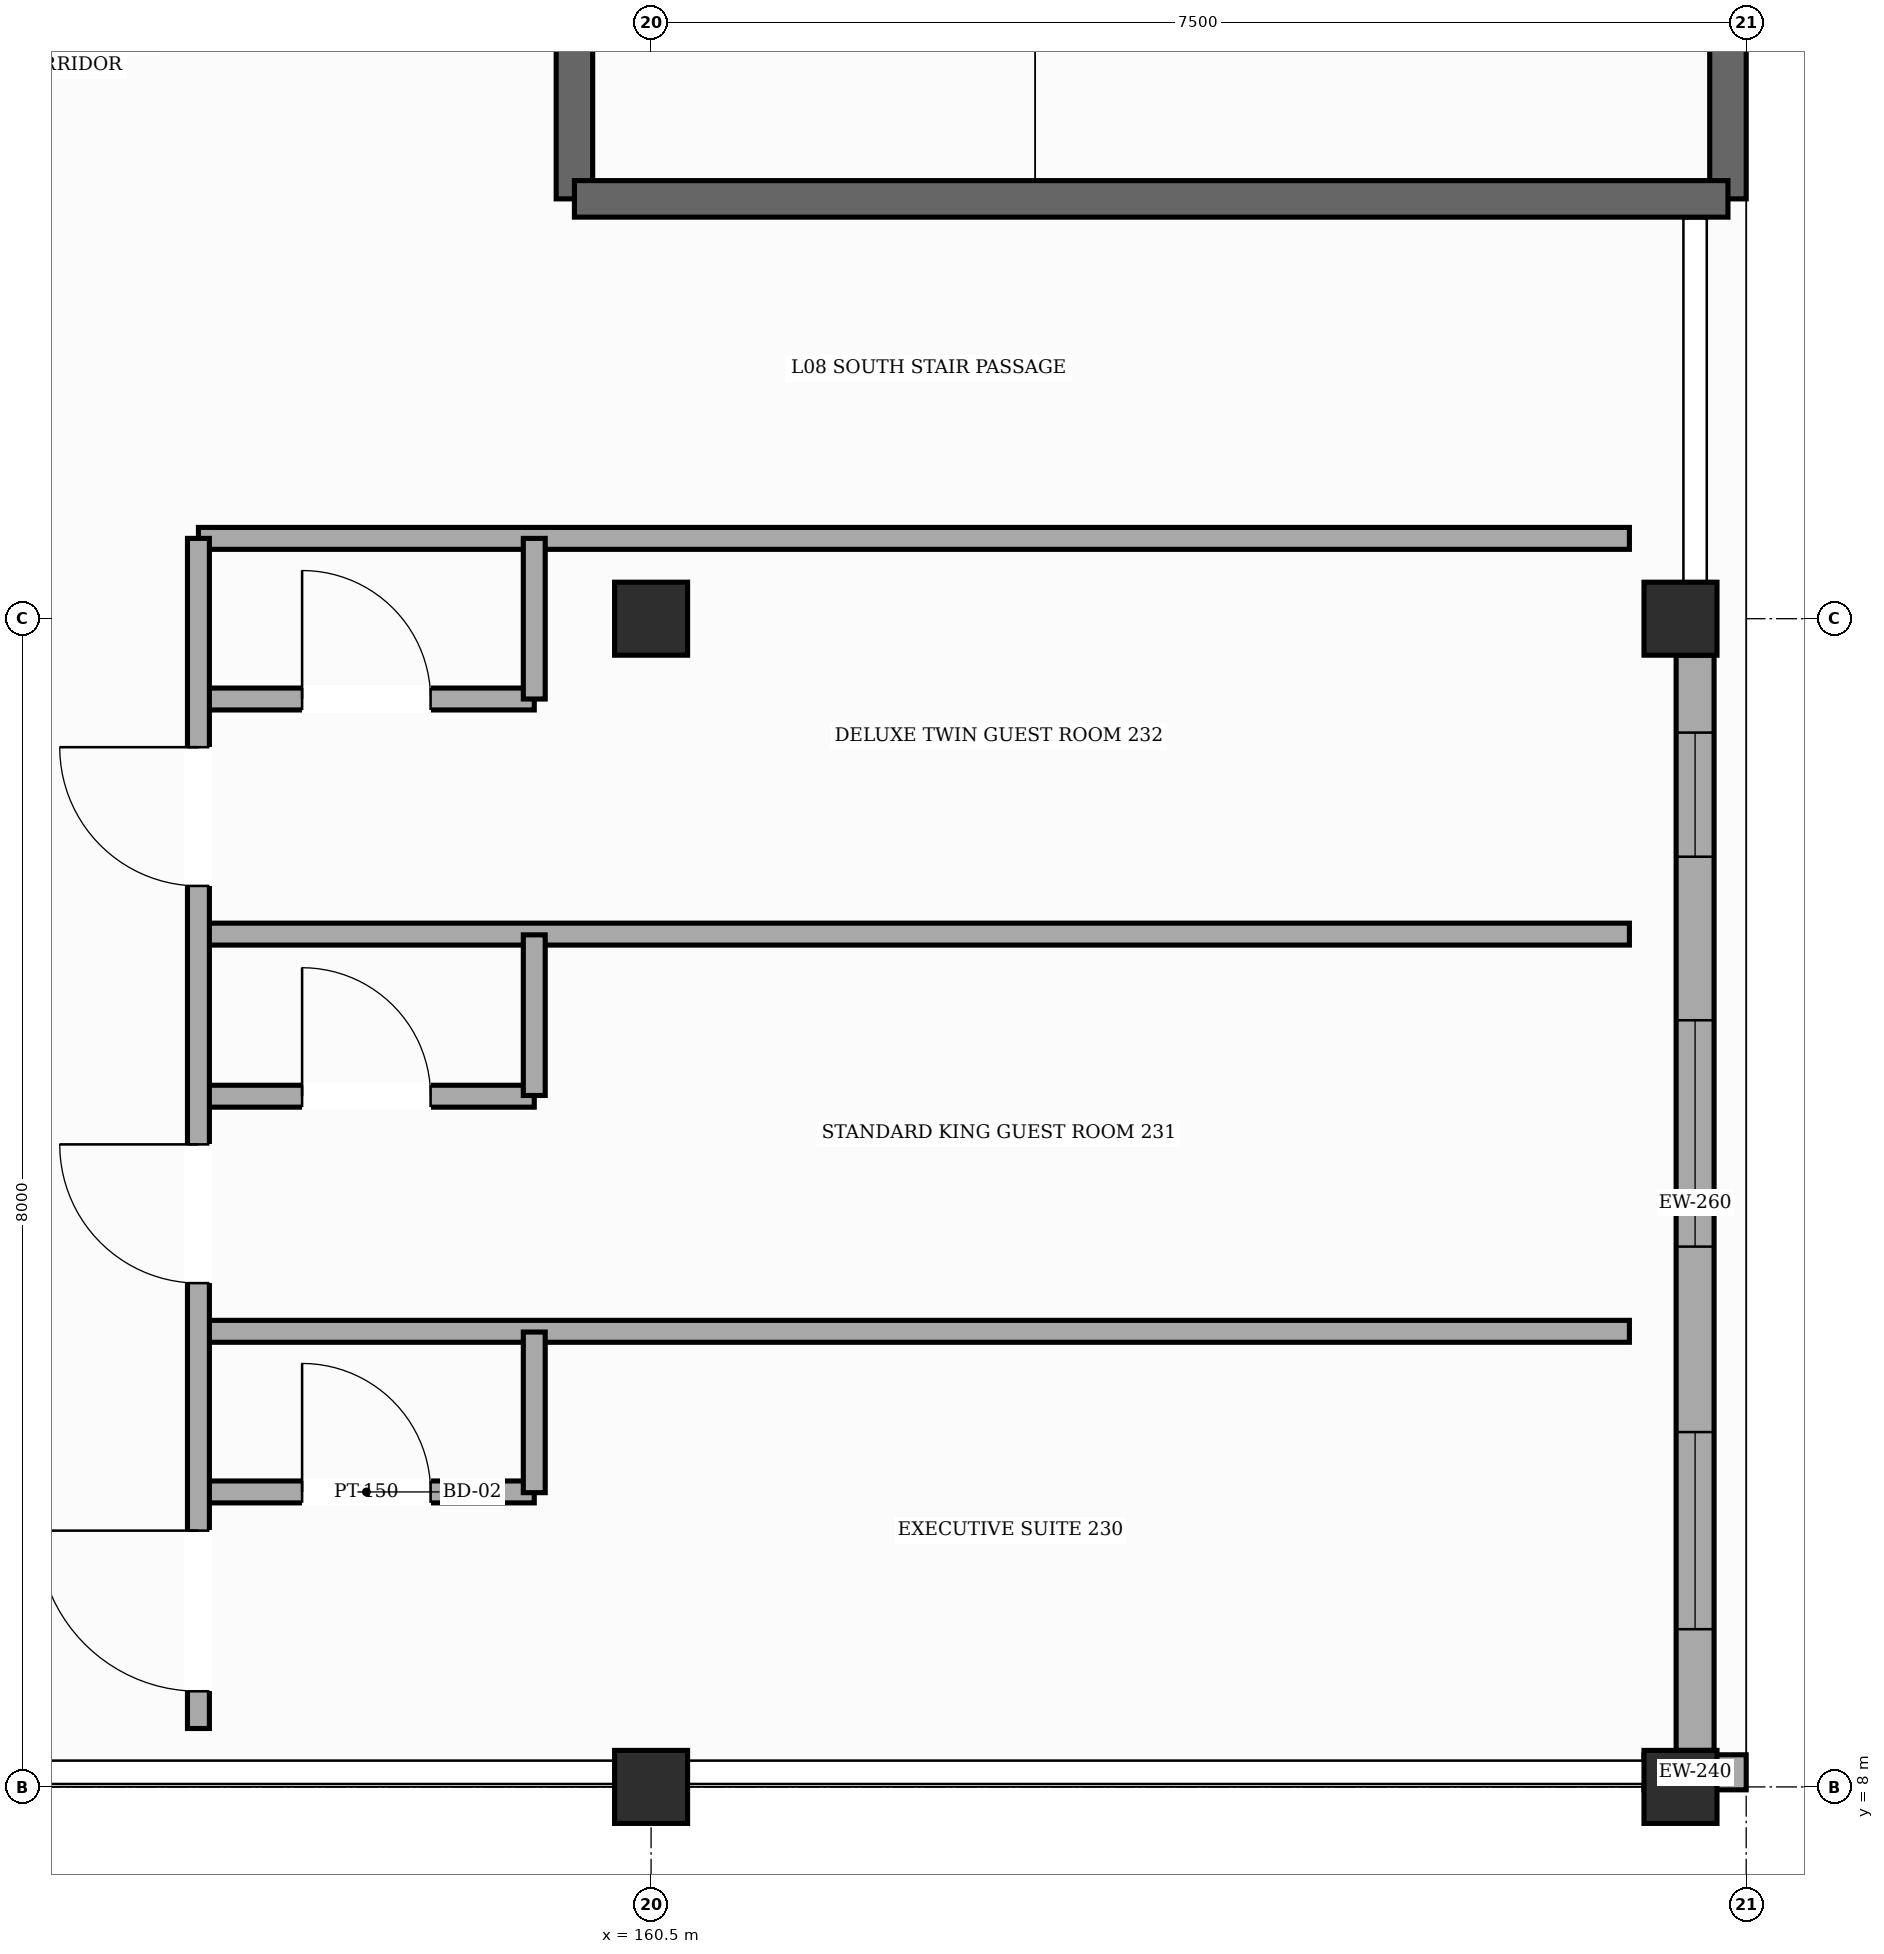
"""IFC4 building model, lengths in metres.
Left out: names, types, materials, properties, quantities, classifications, styles, units other than length and angle.
Written with IfcOpenShell. Run it as: python <this file> out.ifc"""

import sys

from ifc_helpers import new_model, si_unit, direction, frame, frame_2d, origin, origin_2d, place, context, subcontext, project, spatial, rectangle, hollow_rectangle, extrude, element, fill, save


model = new_model("IFC4")
c1 = context("Model", 3, precision=1e-05, world=origin(), true_north=direction((0.0, 1.0)))
c2 = subcontext(c1, "Body", "Model", "MODEL_VIEW")
j1 = project(units=[si_unit("LENGTHUNIT", "METRE"), si_unit("PLANEANGLEUNIT", "RADIAN")], contexts=[c1])
p1 = place(None, origin())
s1 = spatial("IfcSite", under=j1, at=p1, CompositionType="ELEMENT")
p2 = place(p1, origin())
s2 = spatial("IfcBuilding", under=s1, at=p2, CompositionType="ELEMENT")
p3 = place(p2, frame((0.0, 0.0, 35.4)))
s3 = spatial("IfcBuildingStorey", under=s2, at=p3, CompositionType="ELEMENT", Elevation=35.4)
for number, where, z_axis, x_axis in (
    (1, (160.5, 8.0, 0.0), (0.0, 0.0, 1.0), (1.0, 0.0, 0.0)),
    (2, (160.5, 16.0, 0.0), (0.0, 0.0, 1.0), (1.0, 0.0, 0.0)),
    (3, (167.55, 8.0, 0.0), (0.0, 0.0, 1.0), (1.0, 0.0, 0.0)),
    (4, (167.55, 16.0, 0.0), (0.0, 0.0, 1.0), (1.0, 0.0, 0.0)),
):
    element("IfcColumn", number, at=place(p3, frame(where, z_axis=z_axis, x_axis=x_axis)), inside=s3, PredefinedType="COLUMN", context=c2, shape_type="SweptSolid", body=[
        extrude(hollow_rectangle(XDim=0.5, YDim=0.5, WallThickness=0.022, InnerFilletRadius=0.022, OuterFilletRadius=0.044, at=origin_2d()), origin(), (0.0, 0.0, 1.0), 3.6),
    ])
p4 = place(p3, frame((167.65, 15.75, 0.0), z_axis=(0.0, 0.0, 1.0), x_axis=(0.0, -1.0, 0.0)))
e5 = element("IfcWall", 5, at=p4, inside=s3, PredefinedType="SOLIDWALL", context=c2, shape_type="SweptSolid", body=[
    extrude(rectangle(XDim=7.5, YDim=0.26, at=frame_2d((3.75, 0.0))), origin(), (0.0, 0.0, 1.0), 2.755),
])
p5 = place(p4, frame((5.32, 0.0, 0.85)))
e6 = element("IfcOpeningElement", 6, at=p5, cuts=e5, PredefinedType="OPENING", context=c2, shape_type="SweptSolid", body=[
    extrude(rectangle(XDim=1.35, YDim=1.65, at=frame_2d((0.675, 0.825))), frame((0.0, 0.14, 0.0), z_axis=(0.0, -1.0, 0.0), x_axis=(1.0, 0.0, 0.0)), (0.0, 0.0, 1.0), 0.28),
])
p6 = place(p4, frame((2.5, 0.0, 0.85)))
e7 = element("IfcOpeningElement", 7, at=p6, cuts=e5, PredefinedType="OPENING", context=c2, shape_type="SweptSolid", body=[
    extrude(rectangle(XDim=1.55, YDim=1.65, at=frame_2d((0.775, 0.825))), frame((0.0, 0.14, 0.0), z_axis=(0.0, -1.0, 0.0), x_axis=(1.0, 0.0, 0.0)), (0.0, 0.0, 1.0), 0.28),
])
p7 = place(p4, frame((0.53, 0.0, 0.85)))
e8 = element("IfcOpeningElement", 8, at=p7, cuts=e5, PredefinedType="OPENING", context=c2, shape_type="SweptSolid", body=[
    extrude(rectangle(XDim=0.85, YDim=1.35, at=frame_2d((0.425, 0.675))), frame((0.0, 0.14, 0.0), z_axis=(0.0, -1.0, 0.0), x_axis=(1.0, 0.0, 0.0)), (0.0, 0.0, 1.0), 0.28),
])
p8 = place(p3, frame((168.0, 8.1, 0.0), z_axis=(0.0, 0.0, 1.0), x_axis=(-1.0, 0.0, 0.0)))
e9 = element("IfcWall", 9, at=p8, inside=s3, PredefinedType="SOLIDWALL", context=c2, shape_type="SweptSolid", body=[
    extrude(rectangle(XDim=0.7, YDim=0.24, at=frame_2d((0.35, 0.0))), origin(), (0.0, 0.0, 1.0), 3.365),
])
for number, where, z_axis, x_axis in (
    (10, (167.875, 22.225, 0.0), (0.0, 0.0, 1.0), (0.0, -1.0, 0.0)),
    (11, (159.975, 18.875, 0.0), (0.0, 0.0, 1.0), (0.0, 1.0, 0.0)),
):
    element("IfcWall", number, at=place(p3, frame(where, z_axis=z_axis, x_axis=x_axis)), inside=s3, PredefinedType="SHEAR", context=c2, shape_type="SweptSolid", body=[
        extrude(rectangle(XDim=3.35, YDim=0.25, at=frame_2d((1.675, 0.0))), origin(), (0.0, 0.0, 1.0), 3.38),
    ])
p9 = place(p3, frame((167.875, 18.875, 0.0), z_axis=(0.0, 0.0, 1.0), x_axis=(-1.0, 0.0, 0.0)))
e12 = element("IfcWall", 12, at=p9, inside=s3, PredefinedType="SHEAR", context=c2, shape_type="SweptSolid", body=[
    extrude(rectangle(XDim=7.9, YDim=0.25, at=frame_2d((3.95, 0.0))), origin(), (0.0, 0.0, 1.0), 3.38),
])
p10 = place(p3, frame((157.4, 10.02, 0.0), z_axis=(0.0, 0.0, 1.0), x_axis=(1.0, 0.0, 0.0)))
e13 = element("IfcWall", 13, at=p10, inside=s3, PredefinedType="PARTITIONING", context=c2, shape_type="SweptSolid", body=[
    extrude(rectangle(XDim=2.3, YDim=0.15, at=frame_2d((1.15, 0.0))), origin(), (0.0, 0.0, 1.0), 3.365),
])
p11 = place(p10, frame((0.71, 0.0, 0.0)))
e14 = element("IfcOpeningElement", 14, at=p11, cuts=e13, PredefinedType="OPENING", context=c2, shape_type="SweptSolid", body=[
    extrude(rectangle(XDim=0.88, YDim=2.12, at=frame_2d((0.44, 1.06))), frame((0.0, 0.085, 0.0), z_axis=(0.0, -1.0, 0.0), x_axis=(1.0, 0.0, 0.0)), (0.0, 0.0, 1.0), 0.17),
])
p12 = place(p3, frame((157.4, 11.12, 0.0), z_axis=(0.0, 0.0, 1.0), x_axis=(1.0, 0.0, 0.0)))
e15 = element("IfcWall", 15, at=p12, inside=s3, PredefinedType="PARTITIONING", context=c2, shape_type="SweptSolid", body=[
    extrude(rectangle(XDim=9.8, YDim=0.15, at=frame_2d((4.9, 0.0))), origin(), (0.0, 0.0, 1.0), 3.365),
])
p13 = place(p3, frame((157.4, 12.73, 0.0), z_axis=(0.0, 0.0, 1.0), x_axis=(1.0, 0.0, 0.0)))
e16 = element("IfcWall", 16, at=p13, inside=s3, PredefinedType="PARTITIONING", context=c2, shape_type="SweptSolid", body=[
    extrude(rectangle(XDim=2.3, YDim=0.15, at=frame_2d((1.15, 0.0))), origin(), (0.0, 0.0, 1.0), 3.365),
])
p14 = place(p13, frame((0.71, 0.0, 0.0)))
e17 = element("IfcOpeningElement", 17, at=p14, cuts=e16, PredefinedType="OPENING", context=c2, shape_type="SweptSolid", body=[
    extrude(rectangle(XDim=0.88, YDim=2.12, at=frame_2d((0.44, 1.06))), frame((0.0, 0.085, 0.0), z_axis=(0.0, -1.0, 0.0), x_axis=(1.0, 0.0, 0.0)), (0.0, 0.0, 1.0), 0.17),
])
p15 = place(p3, frame((157.4, 13.84, 0.0), z_axis=(0.0, 0.0, 1.0), x_axis=(1.0, 0.0, 0.0)))
e18 = element("IfcWall", 18, at=p15, inside=s3, PredefinedType="PARTITIONING", context=c2, shape_type="SweptSolid", body=[
    extrude(rectangle(XDim=9.8, YDim=0.15, at=frame_2d((4.9, 0.0))), origin(), (0.0, 0.0, 1.0), 3.365),
])
p16 = place(p3, frame((157.4, 15.45, 0.0), z_axis=(0.0, 0.0, 1.0), x_axis=(1.0, 0.0, 0.0)))
e19 = element("IfcWall", 19, at=p16, inside=s3, PredefinedType="PARTITIONING", context=c2, shape_type="SweptSolid", body=[
    extrude(rectangle(XDim=2.3, YDim=0.15, at=frame_2d((1.15, 0.0))), origin(), (0.0, 0.0, 1.0), 3.365),
])
p17 = place(p16, frame((0.71, 0.0, 0.0)))
e20 = element("IfcOpeningElement", 20, at=p17, cuts=e19, PredefinedType="OPENING", context=c2, shape_type="SweptSolid", body=[
    extrude(rectangle(XDim=0.88, YDim=2.12, at=frame_2d((0.44, 1.06))), frame((0.0, 0.085, 0.0), z_axis=(0.0, -1.0, 0.0), x_axis=(1.0, 0.0, 0.0)), (0.0, 0.0, 1.0), 0.17),
])
p18 = place(p3, frame((157.4, 16.55, 0.0), z_axis=(0.0, 0.0, 1.0), x_axis=(1.0, 0.0, 0.0)))
e21 = element("IfcWall", 21, at=p18, inside=s3, PredefinedType="PARTITIONING", context=c2, shape_type="SweptSolid", body=[
    extrude(rectangle(XDim=9.8, YDim=0.15, at=frame_2d((4.9, 0.0))), origin(), (0.0, 0.0, 1.0), 3.365),
])
p19 = place(p3, frame((157.4, 8.4, 0.0), z_axis=(0.0, 0.0, 1.0), x_axis=(0.0, 1.0, 0.0)))
e22 = element("IfcWall", 22, at=p19, inside=s3, PredefinedType="PARTITIONING", context=c2, shape_type="SweptSolid", body=[
    extrude(rectangle(XDim=8.15, YDim=0.15, at=frame_2d((4.075, 0.0))), origin(), (0.0, 0.0, 1.0), 3.365),
])
p20 = place(p19, frame((0.255, 0.0, 0.0)))
e23 = element("IfcOpeningElement", 23, at=p20, cuts=e22, PredefinedType="OPENING", context=c2, shape_type="SweptSolid", body=[
    extrude(rectangle(XDim=1.1, YDim=2.2, at=frame_2d((0.55, 1.1))), frame((0.0, 0.085, 0.0), z_axis=(0.0, -1.0, 0.0), x_axis=(1.0, 0.0, 0.0)), (0.0, 0.0, 1.0), 0.17),
])
p21 = place(p19, frame((3.05, 0.0, 0.0)))
e24 = element("IfcOpeningElement", 24, at=p21, cuts=e22, PredefinedType="OPENING", context=c2, shape_type="SweptSolid", body=[
    extrude(rectangle(XDim=0.95, YDim=2.15, at=frame_2d((0.475, 1.075))), frame((0.0, 0.085, 0.0), z_axis=(0.0, -1.0, 0.0), x_axis=(1.0, 0.0, 0.0)), (0.0, 0.0, 1.0), 0.17),
])
p22 = place(p19, frame((5.77, 0.0, 0.0)))
e25 = element("IfcOpeningElement", 25, at=p22, cuts=e22, PredefinedType="OPENING", context=c2, shape_type="SweptSolid", body=[
    extrude(rectangle(XDim=0.95, YDim=2.15, at=frame_2d((0.475, 1.075))), frame((0.0, 0.085, 0.0), z_axis=(0.0, -1.0, 0.0), x_axis=(1.0, 0.0, 0.0)), (0.0, 0.0, 1.0), 0.17),
])
p23 = place(p3, frame((159.7, 10.015, 0.0), z_axis=(0.0, 0.0, 1.0), x_axis=(0.0, 1.0, 0.0)))
e26 = element("IfcWall", 26, at=p23, inside=s3, PredefinedType="PARTITIONING", context=c2, shape_type="SweptSolid", body=[
    extrude(rectangle(XDim=1.1, YDim=0.15, at=frame_2d((0.55, 0.0))), origin(), (0.0, 0.0, 1.0), 3.365),
])
p24 = place(p3, frame((159.7, 12.735, 0.0), z_axis=(0.0, 0.0, 1.0), x_axis=(0.0, 1.0, 0.0)))
e27 = element("IfcWall", 27, at=p24, inside=s3, PredefinedType="PARTITIONING", context=c2, shape_type="SweptSolid", body=[
    extrude(rectangle(XDim=1.1, YDim=0.15, at=frame_2d((0.55, 0.0))), origin(), (0.0, 0.0, 1.0), 3.365),
])
p25 = place(p3, frame((159.7, 15.45, 0.0), z_axis=(0.0, 0.0, 1.0), x_axis=(0.0, 1.0, 0.0)))
e28 = element("IfcWall", 28, at=p25, inside=s3, PredefinedType="PARTITIONING", context=c2, shape_type="SweptSolid", body=[
    extrude(rectangle(XDim=1.1, YDim=0.15, at=frame_2d((0.55, 0.0))), origin(), (0.0, 0.0, 1.0), 3.365),
])
p26 = place(p5, origin())
e29 = element("IfcWindow", 29, at=p26, inside=s3, PartitioningType="SINGLE_PANEL", PredefinedType="WINDOW", context=c2, shape_type="SweptSolid", body=[
    extrude(rectangle(XDim=1.35, YDim=1.65, at=frame_2d((0.675, 0.825))), frame((0.0, 0.03, 0.0), z_axis=(0.0, -1.0, 0.0), x_axis=(1.0, 0.0, 0.0)), (0.0, 0.0, 1.0), 0.06),
])
fill(e6, e29)
p27 = place(p6, origin())
e30 = element("IfcWindow", 30, at=p27, inside=s3, PartitioningType="SINGLE_PANEL", PredefinedType="WINDOW", context=c2, shape_type="SweptSolid", body=[
    extrude(rectangle(XDim=1.55, YDim=1.65, at=frame_2d((0.775, 0.825))), frame((0.0, 0.03, 0.0), z_axis=(0.0, -1.0, 0.0), x_axis=(1.0, 0.0, 0.0)), (0.0, 0.0, 1.0), 0.06),
])
fill(e7, e30)
p28 = place(p7, origin())
e31 = element("IfcWindow", 31, at=p28, inside=s3, PartitioningType="SINGLE_PANEL", PredefinedType="WINDOW", context=c2, shape_type="SweptSolid", body=[
    extrude(rectangle(XDim=0.85, YDim=1.35, at=frame_2d((0.425, 0.675))), frame((0.0, 0.03, 0.0), z_axis=(0.0, -1.0, 0.0), x_axis=(1.0, 0.0, 0.0)), (0.0, 0.0, 1.0), 0.06),
])
fill(e8, e31)
p29 = place(p20, origin())
e32 = element("IfcDoor", 32, at=p29, inside=s3, OperationType="SINGLE_SWING_RIGHT", PredefinedType="DOOR", context=c2, shape_type="SweptSolid", body=[
    extrude(rectangle(XDim=1.1, YDim=2.2, at=frame_2d((0.55, 1.1))), frame((0.0, 0.025, 0.0), z_axis=(0.0, -1.0, 0.0), x_axis=(1.0, 0.0, 0.0)), (0.0, 0.0, 1.0), 0.05),
])
fill(e23, e32)
p30 = place(p11, origin())
e33 = element("IfcDoor", 33, at=p30, inside=s3, OperationType="SINGLE_SWING_LEFT", PredefinedType="DOOR", context=c2, shape_type="SweptSolid", body=[
    extrude(rectangle(XDim=0.88, YDim=2.12, at=frame_2d((0.44, 1.06))), frame((0.0, 0.025, 0.0), z_axis=(0.0, -1.0, 0.0), x_axis=(1.0, 0.0, 0.0)), (0.0, 0.0, 1.0), 0.05),
])
fill(e14, e33)
p31 = place(p21, origin())
e34 = element("IfcDoor", 34, at=p31, inside=s3, OperationType="SINGLE_SWING_RIGHT", PredefinedType="DOOR", context=c2, shape_type="SweptSolid", body=[
    extrude(rectangle(XDim=0.95, YDim=2.15, at=frame_2d((0.475, 1.075))), frame((0.0, 0.025, 0.0), z_axis=(0.0, -1.0, 0.0), x_axis=(1.0, 0.0, 0.0)), (0.0, 0.0, 1.0), 0.05),
])
fill(e24, e34)
p32 = place(p14, origin())
e35 = element("IfcDoor", 35, at=p32, inside=s3, OperationType="SINGLE_SWING_LEFT", PredefinedType="DOOR", context=c2, shape_type="SweptSolid", body=[
    extrude(rectangle(XDim=0.88, YDim=2.12, at=frame_2d((0.44, 1.06))), frame((0.0, 0.025, 0.0), z_axis=(0.0, -1.0, 0.0), x_axis=(1.0, 0.0, 0.0)), (0.0, 0.0, 1.0), 0.05),
])
fill(e17, e35)
p33 = place(p22, origin())
e36 = element("IfcDoor", 36, at=p33, inside=s3, OperationType="SINGLE_SWING_RIGHT", PredefinedType="DOOR", context=c2, shape_type="SweptSolid", body=[
    extrude(rectangle(XDim=0.95, YDim=2.15, at=frame_2d((0.475, 1.075))), frame((0.0, 0.025, 0.0), z_axis=(0.0, -1.0, 0.0), x_axis=(1.0, 0.0, 0.0)), (0.0, 0.0, 1.0), 0.05),
])
fill(e25, e36)
p34 = place(p17, origin())
e37 = element("IfcDoor", 37, at=p34, inside=s3, OperationType="SINGLE_SWING_LEFT", PredefinedType="DOOR", context=c2, shape_type="SweptSolid", body=[
    extrude(rectangle(XDim=0.88, YDim=2.12, at=frame_2d((0.44, 1.06))), frame((0.0, 0.025, 0.0), z_axis=(0.0, -1.0, 0.0), x_axis=(1.0, 0.0, 0.0)), (0.0, 0.0, 1.0), 0.05),
])
fill(e20, e37)
save(model, sys.argv[1])
